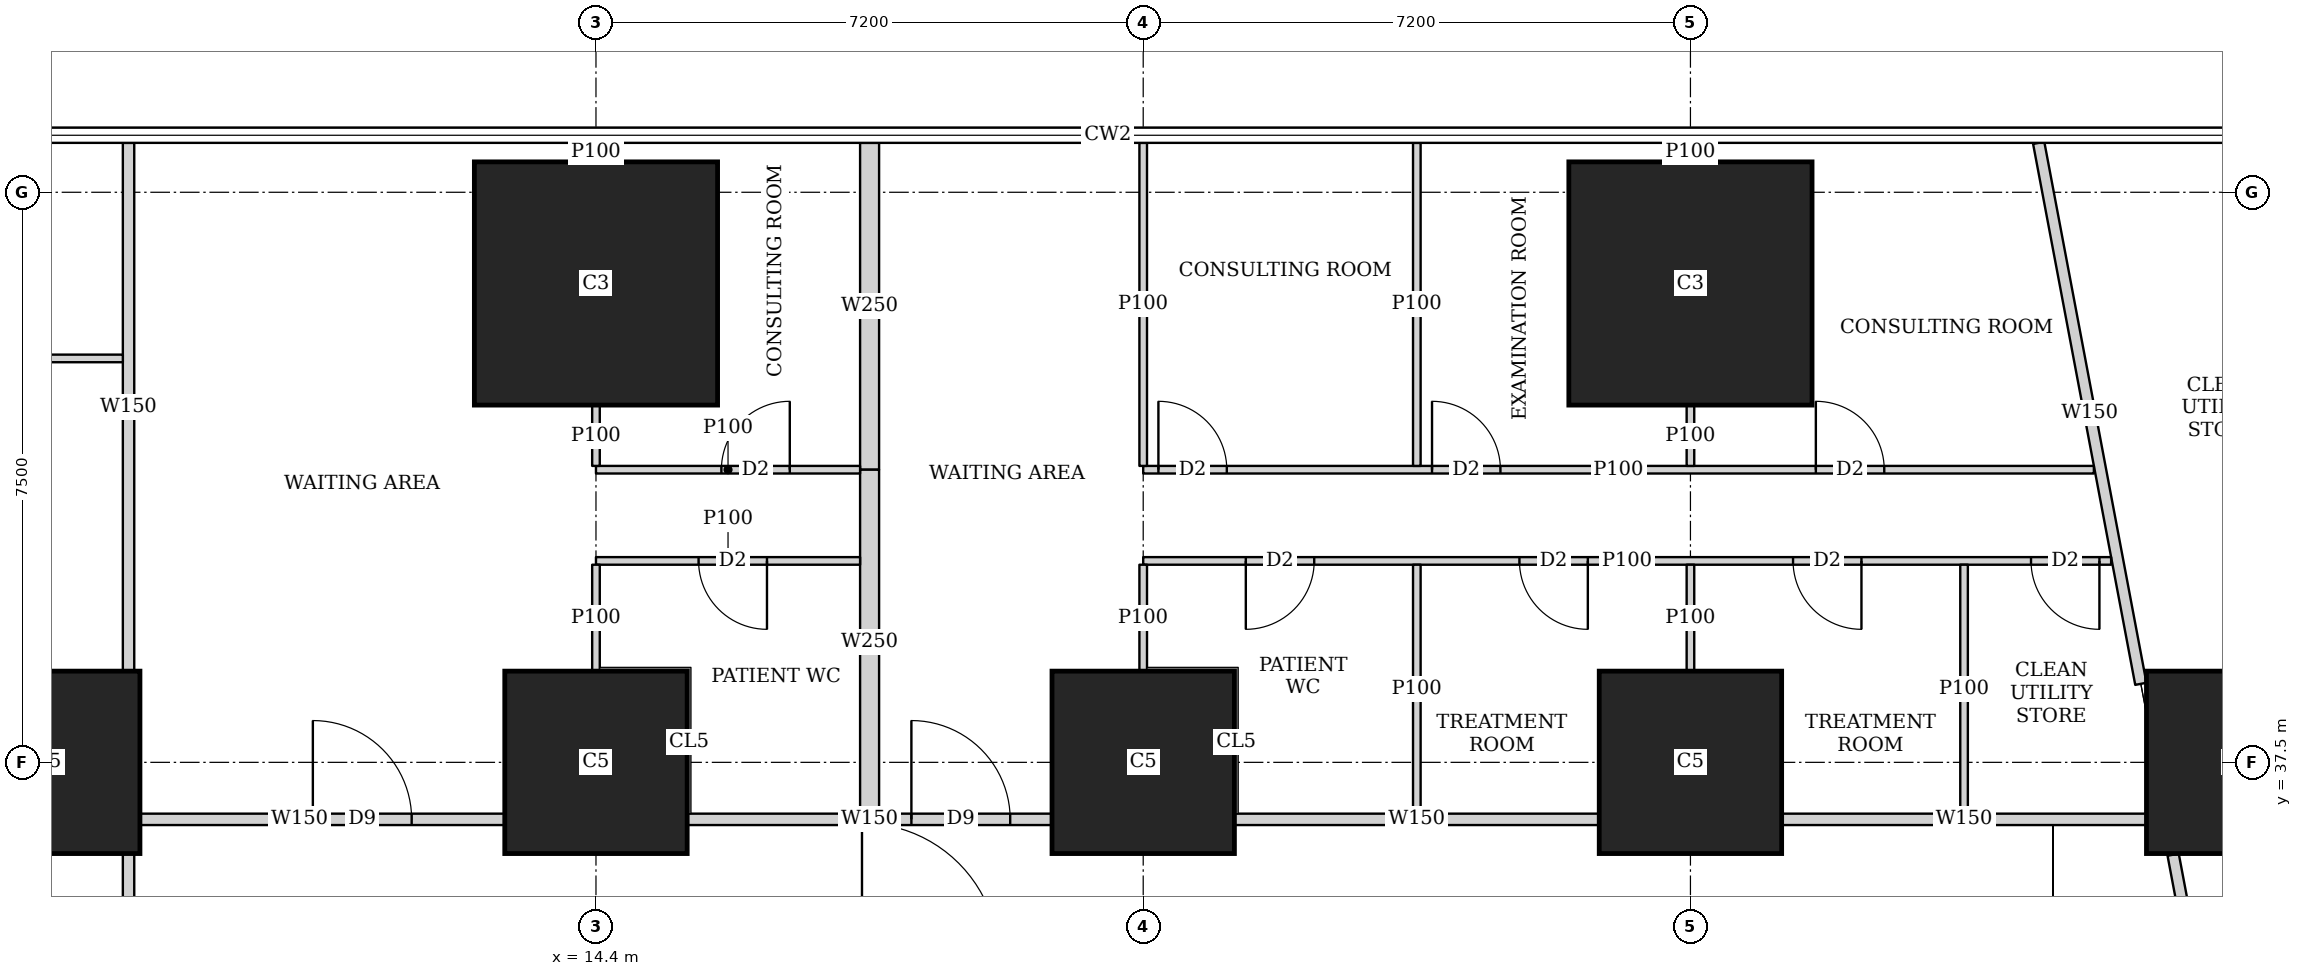
"""IFC4 building model, lengths in metres.
Left out: names, types, materials, properties, quantities, classifications, styles, units other than length and angle.
Written with IfcOpenShell. Run it as: python <this file> out.ifc"""

import sys

from ifc_helpers import new_model, si_unit, direction, frame, frame_2d, origin, origin_2d, place, context, subcontext, project, spatial, rectangle, extrude, element, fill, save


model = new_model("IFC4")
c1 = context("Model", 3, precision=1e-05, world=origin(), true_north=direction((0.0, 1.0)))
c2 = subcontext(c1, "Body", "Model", "MODEL_VIEW")
j1 = project(units=[si_unit("LENGTHUNIT", "METRE"), si_unit("PLANEANGLEUNIT", "RADIAN")], contexts=[c1])
p1 = place(None, origin())
s1 = spatial("IfcSite", under=j1, at=p1, CompositionType="ELEMENT")
p2 = place(p1, origin())
s2 = spatial("IfcBuilding", under=s1, at=p2, CompositionType="ELEMENT")
p3 = place(p2, frame((0.0, 0.0, 5.6)))
s3 = spatial("IfcBuildingStorey", under=s2, at=p3, CompositionType="ELEMENT", Elevation=5.6)
for number, where, z_axis, x_axis in (
    (1, (7.2, 37.5, 0.0), (0.0, 0.0, 1.0), (1.0, 0.0, 0.0)),
    (2, (14.4, 37.5, 0.0), (0.0, 0.0, 1.0), (1.0, 0.0, 0.0)),
    (3, (21.6, 37.5, 0.0), (0.0, 0.0, 1.0), (1.0, 0.0, 0.0)),
    (4, (28.8, 37.5, 0.0), (0.0, 0.0, 1.0), (1.0, 0.0, 0.0)),
    (5, (36.0, 37.5, 0.0), (0.0, 0.0, 1.0), (1.0, 0.0, 0.0)),
):
    element("IfcColumn", number, at=place(p3, frame(where, z_axis=z_axis, x_axis=x_axis)), inside=s3, PredefinedType="COLUMN", context=c2, shape_type="SweptSolid", body=[
        extrude(rectangle(XDim=2.4, YDim=2.4, at=origin_2d()), origin(), (0.0, 0.0, 1.0), 4.5),
    ])
for number, where, z_axis, x_axis in (
    (6, (14.4, 43.8, 0.0), (0.0, 0.0, 1.0), (1.0, 0.0, 0.0)),
    (7, (28.8, 43.8, 0.0), (0.0, 0.0, 1.0), (1.0, 0.0, 0.0)),
):
    element("IfcColumn", number, at=place(p3, frame(where, z_axis=z_axis, x_axis=x_axis)), inside=s3, PredefinedType="COLUMN", context=c2, shape_type="SweptSolid", body=[
        extrude(rectangle(XDim=3.2, YDim=3.2, at=origin_2d()), origin(), (0.0, 0.0, 1.0), 4.5),
    ])
p4 = place(p3, frame((8.25, 31.201, 0.0), z_axis=(0.0, 0.0, 1.0), x_axis=(0.0, 1.0, 0.0)))
e8 = element("IfcWall", 8, at=p4, inside=s3, PredefinedType="SOLIDWALL", context=c2, shape_type="SweptSolid", body=[
    extrude(rectangle(XDim=5.098, YDim=0.15, at=frame_2d((2.549, 0.0))), origin(), (0.0, 0.0, 1.0), 4.2),
])
p5 = place(p3, frame((8.25, 38.701, 0.0), z_axis=(0.0, 0.0, 1.0), x_axis=(0.0, 1.0, 0.0)))
e9 = element("IfcWall", 9, at=p5, inside=s3, PredefinedType="SOLIDWALL", context=c2, shape_type="SweptSolid", body=[
    extrude(rectangle(XDim=6.949, YDim=0.15, at=frame_2d((3.475, 0.0))), origin(), (0.0, 0.0, 1.0), 2.4),
])
p6 = place(p3, frame((8.401, 36.75, 0.0), z_axis=(0.0, 0.0, 1.0), x_axis=(1.0, 0.0, 0.0)))
e10 = element("IfcWall", 10, at=p6, inside=s3, PredefinedType="SOLIDWALL", context=c2, shape_type="SweptSolid", body=[
    extrude(rectangle(XDim=4.798, YDim=0.15, at=frame_2d((2.399, 0.0))), origin(), (0.0, 0.0, 1.0), 2.6),
])
p7 = place(p6, frame((2.274, 0.0, 0.0)))
e11 = element("IfcOpeningElement", 11, at=p7, cuts=e10, PredefinedType="OPENING", context=c2, shape_type="SweptSolid", body=[
    extrude(rectangle(XDim=1.3, YDim=2.1, at=frame_2d((0.65, 1.05))), frame((0.0, 0.085, 0.0), z_axis=(0.0, -1.0, 0.0), x_axis=(1.0, 0.0, 0.0)), (0.0, 0.0, 1.0), 0.17),
])
p8 = place(p3, frame((15.601, 36.75, 0.0), z_axis=(0.0, 0.0, 1.0), x_axis=(1.0, 0.0, 0.0)))
e12 = element("IfcWall", 12, at=p8, inside=s3, PredefinedType="SOLIDWALL", context=c2, shape_type="SweptSolid", body=[
    extrude(rectangle(XDim=4.798, YDim=0.15, at=frame_2d((2.399, 0.0))), origin(), (0.0, 0.0, 1.0), 2.6),
])
p9 = place(p8, frame((2.949, 0.0, 0.0)))
e13 = element("IfcOpeningElement", 13, at=p9, cuts=e12, PredefinedType="OPENING", context=c2, shape_type="SweptSolid", body=[
    extrude(rectangle(XDim=1.3, YDim=2.1, at=frame_2d((0.65, 1.05))), frame((0.0, 0.085, 0.0), z_axis=(0.0, -1.0, 0.0), x_axis=(1.0, 0.0, 0.0)), (0.0, 0.0, 1.0), 0.17),
])
for number, where, z_axis, x_axis in (
    (14, (22.801, 36.75, 0.0), (0.0, 0.0, 1.0), (1.0, 0.0, 0.0)),
    (15, (30.001, 36.75, 0.0), (0.0, 0.0, 1.0), (1.0, 0.0, 0.0)),
):
    element("IfcWall", number, at=place(p3, frame(where, z_axis=z_axis, x_axis=x_axis)), inside=s3, PredefinedType="SOLIDWALL", context=c2, shape_type="SweptSolid", body=[
        extrude(rectangle(XDim=4.798, YDim=0.15, at=frame_2d((2.399, 0.0))), origin(), (0.0, 0.0, 1.0), 2.6),
    ])
p10 = place(p3, frame((33.382, 45.65, 0.0), z_axis=(0.0, 0.0, 1.0), x_axis=(0.185564463355, -0.982632092871, 0.0)))
e16 = element("IfcWall", 16, at=p10, inside=s3, PredefinedType="SOLIDWALL", context=c2, shape_type="SweptSolid", body=[
    extrude(rectangle(XDim=7.243, YDim=0.15, at=frame_2d((3.621, 0.0))), origin(), (0.0, 0.0, 1.0), 2.4),
])
p11 = place(p3, frame((35.151, 36.285, 0.0), z_axis=(0.0, 0.0, 1.0), x_axis=(0.18558085056, -0.982628998099, 0.0)))
e17 = element("IfcWall", 17, at=p11, inside=s3, PredefinedType="SOLIDWALL", context=c2, shape_type="SweptSolid", body=[
    extrude(rectangle(XDim=34.352, YDim=0.15, at=frame_2d((17.176, 0.0))), origin(), (0.0, 0.0, 1.0), 2.4),
])
p12 = place(p11, frame((13.189, 0.0, 0.0)))
e18 = element("IfcOpeningElement", 18, at=p12, cuts=e17, PredefinedType="OPENING", context=c2, shape_type="SweptSolid", body=[
    extrude(rectangle(XDim=1.3, YDim=2.1, at=frame_2d((0.65, 1.05))), frame((0.0, 0.085, 0.0), z_axis=(0.0, -1.0, 0.0), x_axis=(1.0, 0.0, 0.0)), (0.0, 0.0, 1.0), 0.17),
])
p13 = place(p11, frame((19.443, 0.0, 0.0)))
e19 = element("IfcOpeningElement", 19, at=p13, cuts=e17, PredefinedType="OPENING", context=c2, shape_type="SweptSolid", body=[
    extrude(rectangle(XDim=1.3, YDim=2.1, at=frame_2d((0.65, 1.05))), frame((0.0, 0.085, 0.0), z_axis=(0.0, -1.0, 0.0), x_axis=(1.0, 0.0, 0.0)), (0.0, 0.0, 1.0), 0.17),
])
p14 = place(p11, frame((25.444, 0.0, 0.0)))
e20 = element("IfcOpeningElement", 20, at=p14, cuts=e17, PredefinedType="OPENING", context=c2, shape_type="SweptSolid", body=[
    extrude(rectangle(XDim=1.3, YDim=2.1, at=frame_2d((0.65, 1.05))), frame((0.0, 0.085, 0.0), z_axis=(0.0, -1.0, 0.0), x_axis=(1.0, 0.0, 0.0)), (0.0, 0.0, 1.0), 0.17),
])
p15 = place(p3, frame((4.9, 42.814, 0.0), z_axis=(0.0, 0.0, 1.0), x_axis=(1.0, 0.0, 0.0)))
e21 = element("IfcWall", 21, at=p15, inside=s3, PredefinedType="PARTITIONING", context=c2, shape_type="SweptSolid", body=[
    extrude(rectangle(XDim=3.275, YDim=0.1, at=frame_2d((1.638, 0.0))), origin(), (0.0, 0.0, 1.0), 2.4),
])
p16 = place(p3, frame((14.4, 41.35, 0.0), z_axis=(0.0, 0.0, 1.0), x_axis=(1.0, 0.0, 0.0)))
e22 = element("IfcWall", 22, at=p16, inside=s3, PredefinedType="PARTITIONING", context=c2, shape_type="SweptSolid", body=[
    extrude(rectangle(XDim=3.475, YDim=0.1, at=frame_2d((1.738, 0.0))), origin(), (0.0, 0.0, 1.0), 2.6),
])
p17 = place(p16, frame((1.65, 0.0, 0.0)))
e23 = element("IfcOpeningElement", 23, at=p17, cuts=e22, PredefinedType="OPENING", context=c2, shape_type="SweptSolid", body=[
    extrude(rectangle(XDim=0.9, YDim=2.1, at=frame_2d((0.45, 1.05))), frame((0.0, 0.06, 0.0), z_axis=(0.0, -1.0, 0.0), x_axis=(1.0, 0.0, 0.0)), (0.0, 0.0, 1.0), 0.12),
])
p18 = place(p3, frame((14.4, 40.15, 0.0), z_axis=(0.0, 0.0, 1.0), x_axis=(1.0, 0.0, 0.0)))
e24 = element("IfcWall", 24, at=p18, inside=s3, PredefinedType="PARTITIONING", context=c2, shape_type="SweptSolid", body=[
    extrude(rectangle(XDim=3.475, YDim=0.1, at=frame_2d((1.738, 0.0))), origin(), (0.0, 0.0, 1.0), 2.6),
])
p19 = place(p18, frame((1.35, 0.0, 0.0)))
e25 = element("IfcOpeningElement", 25, at=p19, cuts=e24, PredefinedType="OPENING", context=c2, shape_type="SweptSolid", body=[
    extrude(rectangle(XDim=0.9, YDim=2.1, at=frame_2d((0.45, 1.05))), frame((0.0, 0.06, 0.0), z_axis=(0.0, -1.0, 0.0), x_axis=(1.0, 0.0, 0.0)), (0.0, 0.0, 1.0), 0.12),
])
p20 = place(p3, frame((14.4, 41.4, 0.0), z_axis=(0.0, 0.0, 1.0), x_axis=(0.0, 1.0, 0.0)))
e26 = element("IfcWall", 26, at=p20, inside=s3, PredefinedType="PARTITIONING", context=c2, shape_type="SweptSolid", body=[
    extrude(rectangle(XDim=0.799, YDim=0.1, at=frame_2d((0.399, 0.0))), origin(), (0.0, 0.0, 1.0), 2.6),
])
p21 = place(p3, frame((14.4, 45.401, 0.0), z_axis=(0.0, 0.0, 1.0), x_axis=(0.0, 1.0, 0.0)))
e27 = element("IfcWall", 27, at=p21, inside=s3, PredefinedType="PARTITIONING", context=c2, shape_type="SweptSolid", body=[
    extrude(rectangle(XDim=0.249, YDim=0.1, at=frame_2d((0.125, 0.0))), origin(), (0.0, 0.0, 1.0), 4.2),
])
p22 = place(p3, frame((14.4, 38.701, 0.0), z_axis=(0.0, 0.0, 1.0), x_axis=(0.0, 1.0, 0.0)))
e28 = element("IfcWall", 28, at=p22, inside=s3, PredefinedType="PARTITIONING", context=c2, shape_type="SweptSolid", body=[
    extrude(rectangle(XDim=1.399, YDim=0.1, at=frame_2d((0.7, 0.0))), origin(), (0.0, 0.0, 1.0), 2.6),
])
p23 = place(p3, frame((21.6, 41.35, 0.0), z_axis=(0.0, 0.0, 1.0), x_axis=(1.0, 0.0, 0.0)))
e29 = element("IfcWall", 29, at=p23, inside=s3, PredefinedType="PARTITIONING", context=c2, shape_type="SweptSolid", body=[
    extrude(rectangle(XDim=12.508, YDim=0.1, at=frame_2d((6.254, 0.0))), origin(), (0.0, 0.0, 1.0), 2.6),
])
p24 = place(p23, frame((0.2, 0.0, 0.0)))
e30 = element("IfcOpeningElement", 30, at=p24, cuts=e29, PredefinedType="OPENING", context=c2, shape_type="SweptSolid", body=[
    extrude(rectangle(XDim=0.9, YDim=2.1, at=frame_2d((0.45, 1.05))), frame((0.0, 0.06, 0.0), z_axis=(0.0, -1.0, 0.0), x_axis=(1.0, 0.0, 0.0)), (0.0, 0.0, 1.0), 0.12),
])
p25 = place(p23, frame((3.8, 0.0, 0.0)))
e31 = element("IfcOpeningElement", 31, at=p25, cuts=e29, PredefinedType="OPENING", context=c2, shape_type="SweptSolid", body=[
    extrude(rectangle(XDim=0.9, YDim=2.1, at=frame_2d((0.45, 1.05))), frame((0.0, 0.06, 0.0), z_axis=(0.0, -1.0, 0.0), x_axis=(1.0, 0.0, 0.0)), (0.0, 0.0, 1.0), 0.12),
])
p26 = place(p23, frame((8.85, 0.0, 0.0)))
e32 = element("IfcOpeningElement", 32, at=p26, cuts=e29, PredefinedType="OPENING", context=c2, shape_type="SweptSolid", body=[
    extrude(rectangle(XDim=0.9, YDim=2.1, at=frame_2d((0.45, 1.05))), frame((0.0, 0.06, 0.0), z_axis=(0.0, -1.0, 0.0), x_axis=(1.0, 0.0, 0.0)), (0.0, 0.0, 1.0), 0.12),
])
p27 = place(p3, frame((21.6, 40.15, 0.0), z_axis=(0.0, 0.0, 1.0), x_axis=(1.0, 0.0, 0.0)))
e33 = element("IfcWall", 33, at=p27, inside=s3, PredefinedType="PARTITIONING", context=c2, shape_type="SweptSolid", body=[
    extrude(rectangle(XDim=12.735, YDim=0.1, at=frame_2d((6.367, 0.0))), origin(), (0.0, 0.0, 1.0), 2.6),
])
p28 = place(p27, frame((1.35, 0.0, 0.0)))
e34 = element("IfcOpeningElement", 34, at=p28, cuts=e33, PredefinedType="OPENING", context=c2, shape_type="SweptSolid", body=[
    extrude(rectangle(XDim=0.9, YDim=2.1, at=frame_2d((0.45, 1.05))), frame((0.0, 0.06, 0.0), z_axis=(0.0, -1.0, 0.0), x_axis=(1.0, 0.0, 0.0)), (0.0, 0.0, 1.0), 0.12),
])
p29 = place(p27, frame((4.95, 0.0, 0.0)))
e35 = element("IfcOpeningElement", 35, at=p29, cuts=e33, PredefinedType="OPENING", context=c2, shape_type="SweptSolid", body=[
    extrude(rectangle(XDim=0.9, YDim=2.1, at=frame_2d((0.45, 1.05))), frame((0.0, 0.06, 0.0), z_axis=(0.0, -1.0, 0.0), x_axis=(1.0, 0.0, 0.0)), (0.0, 0.0, 1.0), 0.12),
])
p30 = place(p27, frame((8.55, 0.0, 0.0)))
e36 = element("IfcOpeningElement", 36, at=p30, cuts=e33, PredefinedType="OPENING", context=c2, shape_type="SweptSolid", body=[
    extrude(rectangle(XDim=0.9, YDim=2.1, at=frame_2d((0.45, 1.05))), frame((0.0, 0.06, 0.0), z_axis=(0.0, -1.0, 0.0), x_axis=(1.0, 0.0, 0.0)), (0.0, 0.0, 1.0), 0.12),
])
p31 = place(p27, frame((11.681, 0.0, 0.0)))
e37 = element("IfcOpeningElement", 37, at=p31, cuts=e33, PredefinedType="OPENING", context=c2, shape_type="SweptSolid", body=[
    extrude(rectangle(XDim=0.9, YDim=2.1, at=frame_2d((0.45, 1.05))), frame((0.0, 0.06, 0.0), z_axis=(0.0, -1.0, 0.0), x_axis=(1.0, 0.0, 0.0)), (0.0, 0.0, 1.0), 0.12),
])
for number, where, z_axis, x_axis in (
    (38, (21.6, 41.4, 0.0), (0.0, 0.0, 1.0), (0.0, 1.0, 0.0)),
    (39, (25.2, 41.4, 0.0), (0.0, 0.0, 1.0), (0.0, 1.0, 0.0)),
):
    element("IfcWall", number, at=place(p3, frame(where, z_axis=z_axis, x_axis=x_axis)), inside=s3, PredefinedType="PARTITIONING", context=c2, shape_type="SweptSolid", body=[
        extrude(rectangle(XDim=4.25, YDim=0.1, at=frame_2d((2.125, 0.0))), origin(), (0.0, 0.0, 1.0), 2.4),
    ])
p32 = place(p3, frame((28.8, 41.4, 0.0), z_axis=(0.0, 0.0, 1.0), x_axis=(0.0, 1.0, 0.0)))
e40 = element("IfcWall", 40, at=p32, inside=s3, PredefinedType="PARTITIONING", context=c2, shape_type="SweptSolid", body=[
    extrude(rectangle(XDim=0.799, YDim=0.1, at=frame_2d((0.399, 0.0))), origin(), (0.0, 0.0, 1.0), 2.6),
])
p33 = place(p3, frame((28.8, 45.401, 0.0), z_axis=(0.0, 0.0, 1.0), x_axis=(0.0, 1.0, 0.0)))
e41 = element("IfcWall", 41, at=p33, inside=s3, PredefinedType="PARTITIONING", context=c2, shape_type="SweptSolid", body=[
    extrude(rectangle(XDim=0.249, YDim=0.1, at=frame_2d((0.125, 0.0))), origin(), (0.0, 0.0, 1.0), 4.2),
])
p34 = place(p3, frame((21.6, 38.701, 0.0), z_axis=(0.0, 0.0, 1.0), x_axis=(0.0, 1.0, 0.0)))
e42 = element("IfcWall", 42, at=p34, inside=s3, PredefinedType="PARTITIONING", context=c2, shape_type="SweptSolid", body=[
    extrude(rectangle(XDim=1.399, YDim=0.1, at=frame_2d((0.7, 0.0))), origin(), (0.0, 0.0, 1.0), 4.2),
])
p35 = place(p3, frame((25.2, 36.825, 0.0), z_axis=(0.0, 0.0, 1.0), x_axis=(0.0, 1.0, 0.0)))
e43 = element("IfcWall", 43, at=p35, inside=s3, PredefinedType="PARTITIONING", context=c2, shape_type="SweptSolid", body=[
    extrude(rectangle(XDim=3.275, YDim=0.1, at=frame_2d((1.638, 0.0))), origin(), (0.0, 0.0, 1.0), 2.6),
])
p36 = place(p3, frame((28.8, 38.701, 0.0), z_axis=(0.0, 0.0, 1.0), x_axis=(0.0, 1.0, 0.0)))
e44 = element("IfcWall", 44, at=p36, inside=s3, PredefinedType="PARTITIONING", context=c2, shape_type="SweptSolid", body=[
    extrude(rectangle(XDim=1.399, YDim=0.1, at=frame_2d((0.7, 0.0))), origin(), (0.0, 0.0, 1.0), 2.6),
])
p37 = place(p3, frame((32.4, 36.825, 0.0), z_axis=(0.0, 0.0, 1.0), x_axis=(0.0, 1.0, 0.0)))
e45 = element("IfcWall", 45, at=p37, inside=s3, PredefinedType="PARTITIONING", context=c2, shape_type="SweptSolid", body=[
    extrude(rectangle(XDim=3.275, YDim=0.1, at=frame_2d((1.638, 0.0))), origin(), (0.0, 0.0, 1.0), 2.6),
])
p38 = place(p3, frame((18.0, 41.35, 0.0), z_axis=(0.0, 0.0, 1.0), x_axis=(0.0, 1.0, 0.0)))
e46 = element("IfcWall", 46, at=p38, inside=s3, PredefinedType="SOLIDWALL", context=c2, shape_type="SweptSolid", body=[
    extrude(rectangle(XDim=4.3, YDim=0.25, at=frame_2d((2.15, 0.0))), origin(), (0.0, 0.0, 1.0), 2.4),
])
p39 = place(p3, frame((18.0, 36.825, 0.0), z_axis=(0.0, 0.0, 1.0), x_axis=(0.0, 1.0, 0.0)))
e47 = element("IfcWall", 47, at=p39, inside=s3, PredefinedType="SOLIDWALL", context=c2, shape_type="SweptSolid", body=[
    extrude(rectangle(XDim=4.525, YDim=0.25, at=frame_2d((2.263, 0.0))), origin(), (0.0, 0.0, 1.0), 2.6),
])
p40 = place(p17, origin())
e48 = element("IfcDoor", 48, at=p40, inside=s3, OperationType="SINGLE_SWING_RIGHT", PredefinedType="DOOR", context=c2, shape_type="SweptSolid", body=[
    extrude(rectangle(XDim=0.9, YDim=2.1, at=frame_2d((0.45, 1.05))), frame((0.0, 0.025, 0.0), z_axis=(0.0, -1.0, 0.0), x_axis=(1.0, 0.0, 0.0)), (0.0, 0.0, 1.0), 0.05),
])
fill(e23, e48)
p41 = place(p19, origin())
e49 = element("IfcDoor", 49, at=p41, inside=s3, OperationType="SINGLE_SWING_LEFT", PredefinedType="DOOR", context=c2, shape_type="SweptSolid", body=[
    extrude(rectangle(XDim=0.9, YDim=2.1, at=frame_2d((0.45, 1.05))), frame((0.0, 0.025, 0.0), z_axis=(0.0, -1.0, 0.0), x_axis=(1.0, 0.0, 0.0)), (0.0, 0.0, 1.0), 0.05),
])
fill(e25, e49)
p42 = place(p7, origin())
e50 = element("IfcDoor", 50, at=p42, inside=s3, OperationType="DOUBLE_DOOR_SINGLE_SWING", PredefinedType="DOOR", context=c2, shape_type="SweptSolid", body=[
    extrude(rectangle(XDim=1.3, YDim=2.1, at=frame_2d((0.65, 1.05))), frame((0.0, 0.025, 0.0), z_axis=(0.0, -1.0, 0.0), x_axis=(1.0, 0.0, 0.0)), (0.0, 0.0, 1.0), 0.05),
])
fill(e11, e50)
p43 = place(p24, origin())
e51 = element("IfcDoor", 51, at=p43, inside=s3, OperationType="SINGLE_SWING_LEFT", PredefinedType="DOOR", context=c2, shape_type="SweptSolid", body=[
    extrude(rectangle(XDim=0.9, YDim=2.1, at=frame_2d((0.45, 1.05))), frame((0.0, 0.025, 0.0), z_axis=(0.0, -1.0, 0.0), x_axis=(1.0, 0.0, 0.0)), (0.0, 0.0, 1.0), 0.05),
])
fill(e30, e51)
p44 = place(p25, origin())
e52 = element("IfcDoor", 52, at=p44, inside=s3, OperationType="SINGLE_SWING_LEFT", PredefinedType="DOOR", context=c2, shape_type="SweptSolid", body=[
    extrude(rectangle(XDim=0.9, YDim=2.1, at=frame_2d((0.45, 1.05))), frame((0.0, 0.025, 0.0), z_axis=(0.0, -1.0, 0.0), x_axis=(1.0, 0.0, 0.0)), (0.0, 0.0, 1.0), 0.05),
])
fill(e31, e52)
p45 = place(p26, origin())
e53 = element("IfcDoor", 53, at=p45, inside=s3, OperationType="SINGLE_SWING_LEFT", PredefinedType="DOOR", context=c2, shape_type="SweptSolid", body=[
    extrude(rectangle(XDim=0.9, YDim=2.1, at=frame_2d((0.45, 1.05))), frame((0.0, 0.025, 0.0), z_axis=(0.0, -1.0, 0.0), x_axis=(1.0, 0.0, 0.0)), (0.0, 0.0, 1.0), 0.05),
])
fill(e32, e53)
p46 = place(p28, origin())
e54 = element("IfcDoor", 54, at=p46, inside=s3, OperationType="SINGLE_SWING_RIGHT", PredefinedType="DOOR", context=c2, shape_type="SweptSolid", body=[
    extrude(rectangle(XDim=0.9, YDim=2.1, at=frame_2d((0.45, 1.05))), frame((0.0, 0.025, 0.0), z_axis=(0.0, -1.0, 0.0), x_axis=(1.0, 0.0, 0.0)), (0.0, 0.0, 1.0), 0.05),
])
fill(e34, e54)
p47 = place(p29, origin())
e55 = element("IfcDoor", 55, at=p47, inside=s3, OperationType="SINGLE_SWING_LEFT", PredefinedType="DOOR", context=c2, shape_type="SweptSolid", body=[
    extrude(rectangle(XDim=0.9, YDim=2.1, at=frame_2d((0.45, 1.05))), frame((0.0, 0.025, 0.0), z_axis=(0.0, -1.0, 0.0), x_axis=(1.0, 0.0, 0.0)), (0.0, 0.0, 1.0), 0.05),
])
fill(e35, e55)
p48 = place(p30, origin())
e56 = element("IfcDoor", 56, at=p48, inside=s3, OperationType="SINGLE_SWING_LEFT", PredefinedType="DOOR", context=c2, shape_type="SweptSolid", body=[
    extrude(rectangle(XDim=0.9, YDim=2.1, at=frame_2d((0.45, 1.05))), frame((0.0, 0.025, 0.0), z_axis=(0.0, -1.0, 0.0), x_axis=(1.0, 0.0, 0.0)), (0.0, 0.0, 1.0), 0.05),
])
fill(e36, e56)
p49 = place(p31, origin())
e57 = element("IfcDoor", 57, at=p49, inside=s3, OperationType="SINGLE_SWING_LEFT", PredefinedType="DOOR", context=c2, shape_type="SweptSolid", body=[
    extrude(rectangle(XDim=0.9, YDim=2.1, at=frame_2d((0.45, 1.05))), frame((0.0, 0.025, 0.0), z_axis=(0.0, -1.0, 0.0), x_axis=(1.0, 0.0, 0.0)), (0.0, 0.0, 1.0), 0.05),
])
fill(e37, e57)
p50 = place(p9, origin())
e58 = element("IfcDoor", 58, at=p50, inside=s3, OperationType="DOUBLE_DOOR_SINGLE_SWING", PredefinedType="DOOR", context=c2, shape_type="SweptSolid", body=[
    extrude(rectangle(XDim=1.3, YDim=2.1, at=frame_2d((0.65, 1.05))), frame((0.0, 0.025, 0.0), z_axis=(0.0, -1.0, 0.0), x_axis=(1.0, 0.0, 0.0)), (0.0, 0.0, 1.0), 0.05),
])
fill(e13, e58)
save(model, sys.argv[1])
